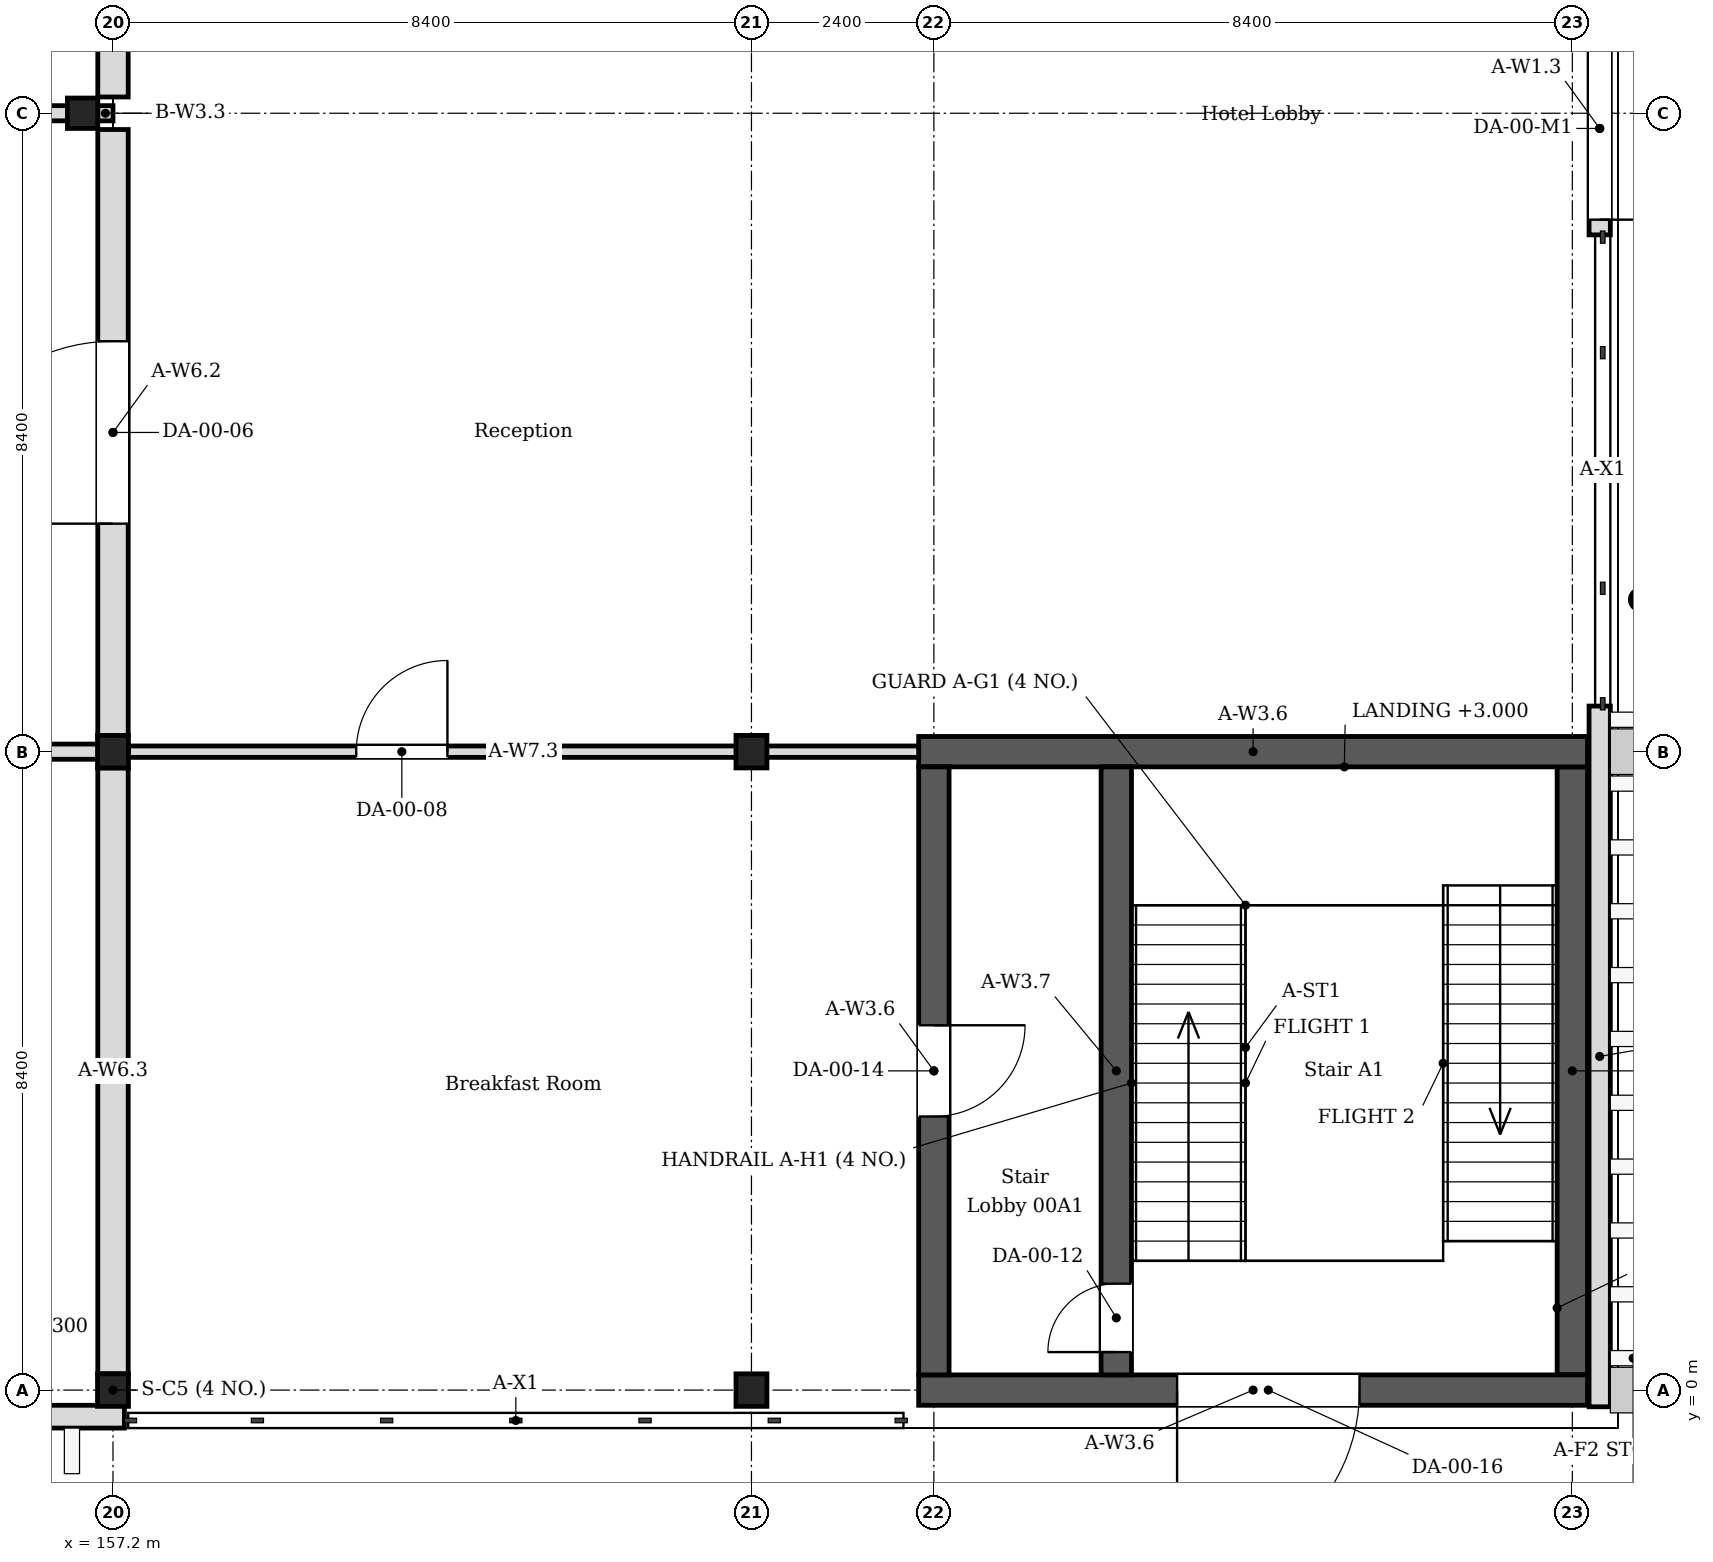
"""IFC4 building model, lengths in metres.
Left out: names, types, materials, properties, quantities, classifications, styles, units other than length and angle.
Written with IfcOpenShell. Run it as: python <this file> out.ifc"""

import sys

from ifc_helpers import new_model, si_unit, direction, frame, frame_2d, origin, origin_2d, place, context, subcontext, project, spatial, rectangle, hollow_circle, i_section, extrude, element, fill, save


model = new_model("IFC4")
c1 = context("Model", 3, precision=1e-05, world=origin(), true_north=direction((0.0, 1.0)))
c2 = subcontext(c1, "Body", "Model", "MODEL_VIEW")
j1 = project(units=[si_unit("LENGTHUNIT", "METRE"), si_unit("PLANEANGLEUNIT", "RADIAN")], contexts=[c1])
p1 = place(None, origin())
s1 = spatial("IfcSite", under=j1, at=p1, CompositionType="ELEMENT")
p2 = place(p1, origin())
s2 = spatial("IfcBuilding", under=s1, at=p2, CompositionType="ELEMENT")
p3 = place(p2, origin())
s3 = spatial("IfcBuildingStorey", under=s2, at=p3, CompositionType="ELEMENT", Elevation=0.0)
for number, where, z_axis, x_axis in (
    (1, (157.2, 0.0, 0.0), (0.0, 0.0, 1.0), (1.0, 0.0, 0.0)),
    (2, (157.2, 8.4, 0.0), (0.0, 0.0, 1.0), (1.0, 0.0, 0.0)),
    (3, (165.6, 0.0, 0.0), (0.0, 0.0, 1.0), (1.0, 0.0, 0.0)),
    (4, (165.6, 8.4, 0.0), (0.0, 0.0, 1.0), (1.0, 0.0, 0.0)),
):
    element("IfcColumn", number, at=place(p3, frame(where, z_axis=z_axis, x_axis=x_axis)), inside=s3, PredefinedType="COLUMN", context=c2, shape_type="SweptSolid", body=[
        extrude(i_section(OverallWidth=0.407, OverallDepth=0.428, WebThickness=0.02, FlangeThickness=0.035, FilletRadius=0.022, at=origin_2d()), origin(), (0.0, 0.0, 1.0), 6.0),
    ])
p4 = place(p3, frame((167.8, 0.0, 0.0), z_axis=(0.0, 0.0, 1.0), x_axis=(1.0, 0.0, 0.0)))
e5 = element("IfcWall", 5, at=p4, inside=s3, PredefinedType="SOLIDWALL", context=c2, shape_type="SweptSolid", body=[
    extrude(rectangle(XDim=8.8, YDim=0.4, at=frame_2d((4.4, 0.0))), origin(), (0.0, 0.0, 1.0), 6.0),
])
p5 = place(p4, frame((3.4, 0.0, 0.0)))
e6 = element("IfcOpeningElement", 6, at=p5, cuts=e5, PredefinedType="OPENING", context=c2, shape_type="SweptSolid", body=[
    extrude(rectangle(XDim=2.4, YDim=2.1, at=frame_2d((1.2, 1.05))), frame((0.0, 0.21, 0.0), z_axis=(0.0, -1.0, 0.0), x_axis=(1.0, 0.0, 0.0)), (0.0, 0.0, 1.0), 0.42),
])
p6 = place(p3, frame((167.8, 8.4, 0.0), z_axis=(0.0, 0.0, 1.0), x_axis=(1.0, 0.0, 0.0)))
e7 = element("IfcWall", 7, at=p6, inside=s3, PredefinedType="SOLIDWALL", context=c2, shape_type="SweptSolid", body=[
    extrude(rectangle(XDim=8.8, YDim=0.4, at=frame_2d((4.4, 0.0))), origin(), (0.0, 0.0, 1.0), 6.0),
])
p7 = place(p3, frame((168.0, 0.2, 0.0), z_axis=(0.0, 0.0, 1.0), x_axis=(0.0, 1.0, 0.0)))
e8 = element("IfcWall", 8, at=p7, inside=s3, PredefinedType="SOLIDWALL", context=c2, shape_type="SweptSolid", body=[
    extrude(rectangle(XDim=8.0, YDim=0.4, at=frame_2d((4.0, 0.0))), origin(), (0.0, 0.0, 1.0), 6.0),
])
p8 = place(p7, frame((3.4, 0.0, 0.0)))
e9 = element("IfcOpeningElement", 9, at=p8, cuts=e8, PredefinedType="OPENING", context=c2, shape_type="SweptSolid", body=[
    extrude(rectangle(XDim=1.2, YDim=2.1, at=frame_2d((0.6, 1.05))), frame((0.0, 0.21, 0.0), z_axis=(0.0, -1.0, 0.0), x_axis=(1.0, 0.0, 0.0)), (0.0, 0.0, 1.0), 0.42),
])
p9 = place(p3, frame((176.4, 0.2, 0.0), z_axis=(0.0, 0.0, 1.0), x_axis=(0.0, 1.0, 0.0)))
e10 = element("IfcWall", 10, at=p9, inside=s3, PredefinedType="SOLIDWALL", context=c2, shape_type="SweptSolid", body=[
    extrude(rectangle(XDim=8.0, YDim=0.4, at=frame_2d((4.0, 0.0))), origin(), (0.0, 0.0, 1.0), 6.0),
])
p10 = place(p3, frame((156.8, 16.8, 0.0), z_axis=(0.0, 0.0, 1.0), x_axis=(1.0, 0.0, 0.0)))
e11 = element("IfcColumn", 11, at=p10, inside=s3, PredefinedType="COLUMN", context=c2, shape_type="SweptSolid", body=[
    extrude(i_section(OverallWidth=0.4, OverallDepth=0.4, WebThickness=0.013, FlangeThickness=0.021, FilletRadius=0.022, at=origin_2d()), origin(), (0.0, 0.0, 1.0), 6.0),
])
p11 = place(p3, frame((176.76, -0.22, 0.0), z_axis=(0.0, 0.0, 1.0), x_axis=(0.0, 1.0, 0.0)))
e12 = element("IfcWall", 12, at=p11, inside=s3, PredefinedType="SOLIDWALL", context=c2, shape_type="SweptSolid", body=[
    extrude(rectangle(XDim=9.22, YDim=0.28, at=frame_2d((4.61, 0.0))), origin(), (0.0, 0.0, 1.0), 10.05),
])
p12 = place(p3, frame((176.76, 15.2, 0.0), z_axis=(0.0, 0.0, 1.0), x_axis=(0.0, 1.0, 0.0)))
e13 = element("IfcWall", 13, at=p12, inside=s3, PredefinedType="SOLIDWALL", context=c2, shape_type="SweptSolid", body=[
    extrude(rectangle(XDim=2.8, YDim=0.28, at=frame_2d((1.4, 0.0))), origin(), (0.0, 0.0, 1.0), 10.05),
])
p13 = place(p12, frame((0.2, 0.0, 0.0)))
e14 = element("IfcOpeningElement", 14, at=p13, cuts=e13, PredefinedType="OPENING", context=c2, shape_type="SweptSolid", body=[
    extrude(rectangle(XDim=2.4, YDim=2.4, at=frame_2d((1.2, 1.2))), frame((0.0, 0.15, 0.0), z_axis=(0.0, -1.0, 0.0), x_axis=(1.0, 0.0, 0.0)), (0.0, 0.0, 1.0), 0.3),
])
p14 = place(p3, frame((177.3, 10.4, 0.0), z_axis=(0.0, 0.0, 1.0), x_axis=(1.0, 0.0, 0.0)))
e15 = element("IfcColumn", 15, at=p14, inside=s3, PredefinedType="COLUMN", context=c2, shape_type="SweptSolid", body=[
    extrude(hollow_circle(Radius=0.136, WallThickness=0.012, at=origin_2d()), origin(), (0.0, 0.0, 1.0), 4.504),
])
p15 = place(p3, frame((134.3, -0.35, 0.0), z_axis=(0.0, 0.0, 1.0), x_axis=(1.0, 0.0, 0.0)))
e16 = element("IfcWall", 16, at=p15, inside=s3, PredefinedType="SOLIDWALL", context=c2, shape_type="SweptSolid", body=[
    extrude(rectangle(XDim=23.05, YDim=0.3, at=frame_2d((11.525, 0.0))), origin(), (0.0, 0.0, 1.0), 5.85),
])
p16 = place(p15, frame((0.34, 0.0, 0.3)))
e17 = element("IfcOpeningElement", 17, at=p16, cuts=e16, PredefinedType="OPENING", context=c2, shape_type="SweptSolid", body=[
    extrude(rectangle(XDim=1.2, YDim=4.2, at=frame_2d((0.6, 2.1))), frame((0.0, 0.16, 0.0), z_axis=(0.0, -1.0, 0.0), x_axis=(1.0, 0.0, 0.0)), (0.0, 0.0, 1.0), 0.32),
])
p17 = place(p15, frame((2.02, 0.0, 0.3)))
e18 = element("IfcOpeningElement", 18, at=p17, cuts=e16, PredefinedType="OPENING", context=c2, shape_type="SweptSolid", body=[
    extrude(rectangle(XDim=1.2, YDim=4.2, at=frame_2d((0.6, 2.1))), frame((0.0, 0.16, 0.0), z_axis=(0.0, -1.0, 0.0), x_axis=(1.0, 0.0, 0.0)), (0.0, 0.0, 1.0), 0.32),
])
p18 = place(p15, frame((3.7, 0.0, 0.3)))
e19 = element("IfcOpeningElement", 19, at=p18, cuts=e16, PredefinedType="OPENING", context=c2, shape_type="SweptSolid", body=[
    extrude(rectangle(XDim=1.2, YDim=4.2, at=frame_2d((0.6, 2.1))), frame((0.0, 0.16, 0.0), z_axis=(0.0, -1.0, 0.0), x_axis=(1.0, 0.0, 0.0)), (0.0, 0.0, 1.0), 0.32),
])
p19 = place(p15, frame((5.38, 0.0, 0.3)))
e20 = element("IfcOpeningElement", 20, at=p19, cuts=e16, PredefinedType="OPENING", context=c2, shape_type="SweptSolid", body=[
    extrude(rectangle(XDim=1.2, YDim=4.2, at=frame_2d((0.6, 2.1))), frame((0.0, 0.16, 0.0), z_axis=(0.0, -1.0, 0.0), x_axis=(1.0, 0.0, 0.0)), (0.0, 0.0, 1.0), 0.32),
])
p20 = place(p15, frame((7.06, 0.0, 0.3)))
e21 = element("IfcOpeningElement", 21, at=p20, cuts=e16, PredefinedType="OPENING", context=c2, shape_type="SweptSolid", body=[
    extrude(rectangle(XDim=1.2, YDim=4.2, at=frame_2d((0.6, 2.1))), frame((0.0, 0.16, 0.0), z_axis=(0.0, -1.0, 0.0), x_axis=(1.0, 0.0, 0.0)), (0.0, 0.0, 1.0), 0.32),
])
p21 = place(p15, frame((8.74, 0.0, 0.3)))
e22 = element("IfcOpeningElement", 22, at=p21, cuts=e16, PredefinedType="OPENING", context=c2, shape_type="SweptSolid", body=[
    extrude(rectangle(XDim=1.2, YDim=4.2, at=frame_2d((0.6, 2.1))), frame((0.0, 0.16, 0.0), z_axis=(0.0, -1.0, 0.0), x_axis=(1.0, 0.0, 0.0)), (0.0, 0.0, 1.0), 0.32),
])
p22 = place(p15, frame((10.42, 0.0, 0.3)))
e23 = element("IfcOpeningElement", 23, at=p22, cuts=e16, PredefinedType="OPENING", context=c2, shape_type="SweptSolid", body=[
    extrude(rectangle(XDim=1.2, YDim=4.2, at=frame_2d((0.6, 2.1))), frame((0.0, 0.16, 0.0), z_axis=(0.0, -1.0, 0.0), x_axis=(1.0, 0.0, 0.0)), (0.0, 0.0, 1.0), 0.32),
])
p23 = place(p15, frame((12.1, 0.0, 0.3)))
e24 = element("IfcOpeningElement", 24, at=p23, cuts=e16, PredefinedType="OPENING", context=c2, shape_type="SweptSolid", body=[
    extrude(rectangle(XDim=1.2, YDim=4.2, at=frame_2d((0.6, 2.1))), frame((0.0, 0.16, 0.0), z_axis=(0.0, -1.0, 0.0), x_axis=(1.0, 0.0, 0.0)), (0.0, 0.0, 1.0), 0.32),
])
p24 = place(p15, frame((13.78, 0.0, 0.3)))
e25 = element("IfcOpeningElement", 25, at=p24, cuts=e16, PredefinedType="OPENING", context=c2, shape_type="SweptSolid", body=[
    extrude(rectangle(XDim=1.2, YDim=4.2, at=frame_2d((0.6, 2.1))), frame((0.0, 0.16, 0.0), z_axis=(0.0, -1.0, 0.0), x_axis=(1.0, 0.0, 0.0)), (0.0, 0.0, 1.0), 0.32),
])
p25 = place(p15, frame((15.46, 0.0, 0.3)))
e26 = element("IfcOpeningElement", 26, at=p25, cuts=e16, PredefinedType="OPENING", context=c2, shape_type="SweptSolid", body=[
    extrude(rectangle(XDim=1.2, YDim=4.2, at=frame_2d((0.6, 2.1))), frame((0.0, 0.16, 0.0), z_axis=(0.0, -1.0, 0.0), x_axis=(1.0, 0.0, 0.0)), (0.0, 0.0, 1.0), 0.32),
])
p26 = place(p15, frame((17.14, 0.0, 0.3)))
e27 = element("IfcOpeningElement", 27, at=p26, cuts=e16, PredefinedType="OPENING", context=c2, shape_type="SweptSolid", body=[
    extrude(rectangle(XDim=1.2, YDim=4.2, at=frame_2d((0.6, 2.1))), frame((0.0, 0.16, 0.0), z_axis=(0.0, -1.0, 0.0), x_axis=(1.0, 0.0, 0.0)), (0.0, 0.0, 1.0), 0.32),
])
p27 = place(p15, frame((18.82, 0.0, 0.3)))
e28 = element("IfcOpeningElement", 28, at=p27, cuts=e16, PredefinedType="OPENING", context=c2, shape_type="SweptSolid", body=[
    extrude(rectangle(XDim=1.2, YDim=4.2, at=frame_2d((0.6, 2.1))), frame((0.0, 0.16, 0.0), z_axis=(0.0, -1.0, 0.0), x_axis=(1.0, 0.0, 0.0)), (0.0, 0.0, 1.0), 0.32),
])
p28 = place(p15, frame((20.5, 0.0, 0.3)))
e29 = element("IfcOpeningElement", 29, at=p28, cuts=e16, PredefinedType="OPENING", context=c2, shape_type="SweptSolid", body=[
    extrude(rectangle(XDim=1.2, YDim=4.2, at=frame_2d((0.6, 2.1))), frame((0.0, 0.16, 0.0), z_axis=(0.0, -1.0, 0.0), x_axis=(1.0, 0.0, 0.0)), (0.0, 0.0, 1.0), 0.32),
])
p29 = place(p3, frame((157.2, 0.214, 0.0), z_axis=(0.0, 0.0, 1.0), x_axis=(0.0, 1.0, 0.0)))
e30 = element("IfcWall", 30, at=p29, inside=s3, PredefinedType="SOLIDWALL", context=c2, shape_type="SweptSolid", body=[
    extrude(rectangle(XDim=7.972, YDim=0.4, at=frame_2d((3.986, 0.0))), origin(), (0.0, 0.0, 1.0), 9.45),
])
p30 = place(p3, frame((157.2, 8.614, 0.0), z_axis=(0.0, 0.0, 1.0), x_axis=(0.0, 1.0, 0.0)))
e31 = element("IfcWall", 31, at=p30, inside=s3, PredefinedType="SOLIDWALL", context=c2, shape_type="SweptSolid", body=[
    extrude(rectangle(XDim=7.972, YDim=0.4, at=frame_2d((3.986, 0.0))), origin(), (0.0, 0.0, 1.0), 7.24),
])
p31 = place(p30, frame((2.786, 0.0, 0.0)))
e32 = element("IfcOpeningElement", 32, at=p31, cuts=e31, PredefinedType="OPENING", context=c2, shape_type="SweptSolid", body=[
    extrude(rectangle(XDim=2.4, YDim=2.1, at=frame_2d((1.2, 1.05))), frame((0.0, 0.21, 0.0), z_axis=(0.0, -1.0, 0.0), x_axis=(1.0, 0.0, 0.0)), (0.0, 0.0, 1.0), 0.42),
])
p32 = place(p3, frame((157.2, 17.014, 0.0), z_axis=(0.0, 0.0, 1.0), x_axis=(0.0, 1.0, 0.0)))
e33 = element("IfcWall", 33, at=p32, inside=s3, PredefinedType="SOLIDWALL", context=c2, shape_type="SweptSolid", body=[
    extrude(rectangle(XDim=7.972, YDim=0.4, at=frame_2d((3.986, 0.0))), origin(), (0.0, 0.0, 1.0), 7.24),
])
p33 = place(p3, frame((157.404, 8.4, 0.0), z_axis=(0.0, 0.0, 1.0), x_axis=(1.0, 0.0, 0.0)))
e34 = element("IfcWall", 34, at=p33, inside=s3, PredefinedType="PARTITIONING", context=c2, shape_type="SweptSolid", body=[
    extrude(rectangle(XDim=10.396, YDim=0.15, at=frame_2d((5.198, 0.0))), origin(), (0.0, 0.0, 1.0), 9.604),
])
p34 = place(p33, frame((2.997, 0.0, 0.0)))
e35 = element("IfcOpeningElement", 35, at=p34, cuts=e34, PredefinedType="OPENING", context=c2, shape_type="SweptSolid", body=[
    extrude(rectangle(XDim=1.2, YDim=2.1, at=frame_2d((0.6, 1.05))), frame((0.0, 0.085, 0.0), z_axis=(0.0, -1.0, 0.0), x_axis=(1.0, 0.0, 0.0)), (0.0, 0.0, 1.0), 0.17),
])
p35 = place(p3, frame((170.4, 0.2, 0.0), z_axis=(0.0, 0.0, 1.0), x_axis=(0.0, 1.0, 0.0)))
e36 = element("IfcWall", 36, at=p35, inside=s3, PredefinedType="SOLIDWALL", context=c2, shape_type="SweptSolid", body=[
    extrude(rectangle(XDim=8.0, YDim=0.4, at=frame_2d((4.0, 0.0))), origin(), (0.0, 0.0, 1.0), 10.05),
])
p36 = place(p35, frame((0.3, 0.0, 0.0)))
e37 = element("IfcOpeningElement", 37, at=p36, cuts=e36, PredefinedType="OPENING", context=c2, shape_type="SweptSolid", body=[
    extrude(rectangle(XDim=0.9, YDim=2.1, at=frame_2d((0.45, 1.05))), frame((0.0, 0.21, 0.0), z_axis=(0.0, -1.0, 0.0), x_axis=(1.0, 0.0, 0.0)), (0.0, 0.0, 1.0), 0.42),
])
p37 = place(p3, frame((151.4, 8.4, 0.0), z_axis=(0.0, 0.0, 1.0), x_axis=(1.0, 0.0, 0.0)))
e38 = element("IfcWall", 38, at=p37, inside=s3, PredefinedType="PARTITIONING", context=c2, shape_type="SweptSolid", body=[
    extrude(rectangle(XDim=5.8, YDim=0.2, at=frame_2d((2.9, 0.0))), origin(), (0.0, 0.0, 1.0), 5.05),
])
p38 = place(p37, frame((3.1, 0.0, 0.0)))
e39 = element("IfcOpeningElement", 39, at=p38, cuts=e38, PredefinedType="OPENING", context=c2, shape_type="SweptSolid", body=[
    extrude(rectangle(XDim=1.8, YDim=2.1, at=frame_2d((0.9, 1.05))), frame((0.0, 0.11, 0.0), z_axis=(0.0, -1.0, 0.0), x_axis=(1.0, 0.0, 0.0)), (0.0, 0.0, 1.0), 0.22),
])
p39 = place(p3, frame((151.4, 16.8, 0.0), z_axis=(0.0, 0.0, 1.0), x_axis=(1.0, 0.0, 0.0)))
e40 = element("IfcWall", 40, at=p39, inside=s3, PredefinedType="PARTITIONING", context=c2, shape_type="SweptSolid", body=[
    extrude(rectangle(XDim=5.2, YDim=0.2, at=frame_2d((2.6, 0.0))), origin(), (0.0, 0.0, 1.0), 5.05),
])
p40 = place(p39, frame((3.5, 0.0, 0.0)))
e41 = element("IfcOpeningElement", 41, at=p40, cuts=e40, PredefinedType="OPENING", context=c2, shape_type="SweptSolid", body=[
    extrude(rectangle(XDim=1.0, YDim=2.1, at=frame_2d((0.5, 1.05))), frame((0.0, 0.11, 0.0), z_axis=(0.0, -1.0, 0.0), x_axis=(1.0, 0.0, 0.0)), (0.0, 0.0, 1.0), 0.22),
])
p41 = place(p3, frame((157.0, 16.8, 0.0), z_axis=(0.0, 0.0, 1.0), x_axis=(1.0, 0.0, 0.0)))
e42 = element("IfcWall", 42, at=p41, inside=s3, PredefinedType="PARTITIONING", context=c2, shape_type="SweptSolid", body=[
    extrude(rectangle(XDim=0.2, YDim=0.2, at=frame_2d((0.1, 0.0))), origin(), (0.0, 0.0, 1.0), 5.05),
])
p42 = place(p13, origin())
e43 = element("IfcDoor", 43, at=p42, inside=s3, OperationType="DOUBLE_DOOR_DOUBLE_SWING", PredefinedType="DOOR", context=c2, shape_type="SweptSolid", body=[
    extrude(rectangle(XDim=2.4, YDim=2.4, at=frame_2d((1.2, 1.2))), frame((0.0, 0.025, 0.0), z_axis=(0.0, -1.0, 0.0), x_axis=(1.0, 0.0, 0.0)), (0.0, 0.0, 1.0), 0.05),
])
fill(e14, e43)
p43 = place(p31, origin())
e44 = element("IfcDoor", 44, at=p43, inside=s3, OperationType="DOUBLE_DOOR_DOUBLE_SWING", PredefinedType="DOOR", context=c2, shape_type="SweptSolid", body=[
    extrude(rectangle(XDim=2.4, YDim=2.1, at=frame_2d((1.2, 1.05))), frame((0.0, 0.025, 0.0), z_axis=(0.0, -1.0, 0.0), x_axis=(1.0, 0.0, 0.0)), (0.0, 0.0, 1.0), 0.05),
])
fill(e32, e44)
p44 = place(p34, origin())
e45 = element("IfcDoor", 45, at=p44, inside=s3, OperationType="SINGLE_SWING_RIGHT", PredefinedType="DOOR", context=c2, shape_type="SweptSolid", body=[
    extrude(rectangle(XDim=1.2, YDim=2.1, at=frame_2d((0.6, 1.05))), frame((0.0, 0.025, 0.0), z_axis=(0.0, -1.0, 0.0), x_axis=(1.0, 0.0, 0.0)), (0.0, 0.0, 1.0), 0.05),
])
fill(e35, e45)
p45 = place(p36, origin())
e46 = element("IfcDoor", 46, at=p45, inside=s3, OperationType="SINGLE_SWING_LEFT", PredefinedType="DOOR", context=c2, shape_type="SweptSolid", body=[
    extrude(rectangle(XDim=0.9, YDim=2.1, at=frame_2d((0.45, 1.05))), frame((0.0, 0.025, 0.0), z_axis=(0.0, -1.0, 0.0), x_axis=(1.0, 0.0, 0.0)), (0.0, 0.0, 1.0), 0.05),
])
fill(e37, e46)
p46 = place(p8, origin())
e47 = element("IfcDoor", 47, at=p46, inside=s3, OperationType="SINGLE_SWING_RIGHT", PredefinedType="DOOR", context=c2, shape_type="SweptSolid", body=[
    extrude(rectangle(XDim=1.2, YDim=2.1, at=frame_2d((0.6, 1.05))), frame((0.0, 0.025, 0.0), z_axis=(0.0, -1.0, 0.0), x_axis=(1.0, 0.0, 0.0)), (0.0, 0.0, 1.0), 0.05),
])
fill(e9, e47)
p47 = place(p5, origin())
e48 = element("IfcDoor", 48, at=p47, inside=s3, OperationType="DOUBLE_DOOR_DOUBLE_SWING", PredefinedType="DOOR", context=c2, shape_type="SweptSolid", body=[
    extrude(rectangle(XDim=2.4, YDim=2.1, at=frame_2d((1.2, 1.05))), frame((0.0, 0.025, 0.0), z_axis=(0.0, -1.0, 0.0), x_axis=(1.0, 0.0, 0.0)), (0.0, 0.0, 1.0), 0.05),
])
fill(e6, e48)
save(model, sys.argv[1])
